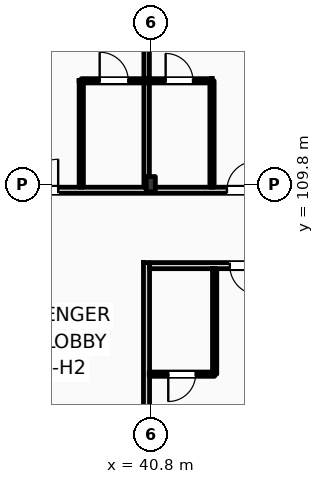
"""IFC4 building model, lengths in metres.
Left out: names, types, materials, properties, quantities, classifications, styles, units other than length and angle.
Written with IfcOpenShell. Run it as: python <this file> out.ifc"""

import sys

from ifc_helpers import new_model, si_unit, direction, frame, frame_2d, origin, origin_2d, place, context, subcontext, project, spatial, rectangle, i_section, extrude, element, fill, save


model = new_model("IFC4")
c1 = context("Model", 3, precision=1e-05, world=origin(), true_north=direction((0.0, 1.0)))
c2 = subcontext(c1, "Body", "Model", "MODEL_VIEW")
j1 = project(units=[si_unit("LENGTHUNIT", "METRE"), si_unit("PLANEANGLEUNIT", "RADIAN")], contexts=[c1])
p1 = place(None, origin())
s1 = spatial("IfcSite", under=j1, at=p1, CompositionType="ELEMENT")
p2 = place(p1, origin())
s2 = spatial("IfcBuilding", under=s1, at=p2, CompositionType="ELEMENT")
p3 = place(p2, frame((0.0, 0.0, 28.2)))
s3 = spatial("IfcBuildingStorey", under=s2, at=p3, CompositionType="ELEMENT", Elevation=28.2)
p4 = place(p3, frame((40.8, 109.8, 0.0), z_axis=(0.0, 0.0, 1.0), x_axis=(1.0, 0.0, 0.0)))
e1 = element("IfcColumn", 1, at=p4, inside=s3, PredefinedType="COLUMN", context=c2, shape_type="SweptSolid", body=[
    extrude(i_section(OverallWidth=0.3, OverallDepth=0.5, WebThickness=0.014, FlangeThickness=0.028, FilletRadius=0.027, at=origin_2d()), origin(), (0.0, 0.0, 1.0), 3.6),
])
p5 = place(p3, frame((10.65, 109.6, 0.0), z_axis=(0.0, 0.0, 1.0), x_axis=(1.0, 0.0, 0.0)))
e2 = element("IfcWall", 2, at=p5, inside=s3, PredefinedType="PARTITIONING", context=c2, shape_type="SweptSolid", body=[
    extrude(rectangle(XDim=109.21, YDim=0.2, at=frame_2d((54.605, 0.0))), origin(), (0.0, 0.0, 1.0), 2.8),
])
p6 = place(p5, frame((12.611, 0.0, 0.0)))
e3 = element("IfcOpeningElement", 3, at=p6, cuts=e2, PredefinedType="OPENING", context=c2, shape_type="SweptSolid", body=[
    extrude(rectangle(XDim=1.02, YDim=2.2, at=frame_2d((0.51, 1.1))), frame((0.0, 0.11, 0.0), z_axis=(0.0, -1.0, 0.0), x_axis=(1.0, 0.0, 0.0)), (0.0, 0.0, 1.0), 0.22),
])
p7 = place(p5, frame((19.451, 0.0, 0.0)))
e4 = element("IfcOpeningElement", 4, at=p7, cuts=e2, PredefinedType="OPENING", context=c2, shape_type="SweptSolid", body=[
    extrude(rectangle(XDim=1.02, YDim=2.2, at=frame_2d((0.51, 1.1))), frame((0.0, 0.11, 0.0), z_axis=(0.0, -1.0, 0.0), x_axis=(1.0, 0.0, 0.0)), (0.0, 0.0, 1.0), 0.22),
])
p8 = place(p5, frame((23.842, 0.0, 0.0)))
e5 = element("IfcOpeningElement", 5, at=p8, cuts=e2, PredefinedType="OPENING", context=c2, shape_type="SweptSolid", body=[
    extrude(rectangle(XDim=1.02, YDim=2.2, at=frame_2d((0.51, 1.1))), frame((0.0, 0.11, 0.0), z_axis=(0.0, -1.0, 0.0), x_axis=(1.0, 0.0, 0.0)), (0.0, 0.0, 1.0), 0.22),
])
p9 = place(p5, frame((26.084, 0.0, 0.0)))
e6 = element("IfcOpeningElement", 6, at=p9, cuts=e2, PredefinedType="OPENING", context=c2, shape_type="SweptSolid", body=[
    extrude(rectangle(XDim=1.02, YDim=2.2, at=frame_2d((0.51, 1.1))), frame((0.0, 0.11, 0.0), z_axis=(0.0, -1.0, 0.0), x_axis=(1.0, 0.0, 0.0)), (0.0, 0.0, 1.0), 0.22),
])
p10 = place(p5, frame((32.655, 0.0, 0.0)))
e7 = element("IfcOpeningElement", 7, at=p10, cuts=e2, PredefinedType="OPENING", context=c2, shape_type="SweptSolid", body=[
    extrude(rectangle(XDim=0.96, YDim=2.2, at=frame_2d((0.48, 1.1))), frame((0.0, 0.11, 0.0), z_axis=(0.0, -1.0, 0.0), x_axis=(1.0, 0.0, 0.0)), (0.0, 0.0, 1.0), 0.22),
])
p11 = place(p5, frame((34.895, 0.0, 0.0)))
e8 = element("IfcOpeningElement", 8, at=p11, cuts=e2, PredefinedType="OPENING", context=c2, shape_type="SweptSolid", body=[
    extrude(rectangle(XDim=0.96, YDim=2.2, at=frame_2d((0.48, 1.1))), frame((0.0, 0.11, 0.0), z_axis=(0.0, -1.0, 0.0), x_axis=(1.0, 0.0, 0.0)), (0.0, 0.0, 1.0), 0.22),
])
p12 = place(p5, frame((41.436, 0.0, 0.0)))
e9 = element("IfcOpeningElement", 9, at=p12, cuts=e2, PredefinedType="OPENING", context=c2, shape_type="SweptSolid", body=[
    extrude(rectangle(XDim=0.96, YDim=2.2, at=frame_2d((0.48, 1.1))), frame((0.0, 0.11, 0.0), z_axis=(0.0, -1.0, 0.0), x_axis=(1.0, 0.0, 0.0)), (0.0, 0.0, 1.0), 0.22),
])
p13 = place(p5, frame((43.427, 0.0, 0.0)))
e10 = element("IfcOpeningElement", 10, at=p13, cuts=e2, PredefinedType="OPENING", context=c2, shape_type="SweptSolid", body=[
    extrude(rectangle(XDim=0.96, YDim=2.2, at=frame_2d((0.48, 1.1))), frame((0.0, 0.11, 0.0), z_axis=(0.0, -1.0, 0.0), x_axis=(1.0, 0.0, 0.0)), (0.0, 0.0, 1.0), 0.22),
])
p14 = place(p5, frame((50.218, 0.0, 0.0)))
e11 = element("IfcOpeningElement", 11, at=p14, cuts=e2, PredefinedType="OPENING", context=c2, shape_type="SweptSolid", body=[
    extrude(rectangle(XDim=0.96, YDim=2.2, at=frame_2d((0.48, 1.1))), frame((0.0, 0.11, 0.0), z_axis=(0.0, -1.0, 0.0), x_axis=(1.0, 0.0, 0.0)), (0.0, 0.0, 1.0), 0.22),
])
p15 = place(p5, frame((54.859, 0.0, 0.0)))
e12 = element("IfcOpeningElement", 12, at=p15, cuts=e2, PredefinedType="OPENING", context=c2, shape_type="SweptSolid", body=[
    extrude(rectangle(XDim=0.96, YDim=2.2, at=frame_2d((0.48, 1.1))), frame((0.0, 0.11, 0.0), z_axis=(0.0, -1.0, 0.0), x_axis=(1.0, 0.0, 0.0)), (0.0, 0.0, 1.0), 0.22),
])
p16 = place(p5, frame((59.0, 0.0, 0.0)))
e13 = element("IfcOpeningElement", 13, at=p16, cuts=e2, PredefinedType="OPENING", context=c2, shape_type="SweptSolid", body=[
    extrude(rectangle(XDim=0.96, YDim=2.2, at=frame_2d((0.48, 1.1))), frame((0.0, 0.11, 0.0), z_axis=(0.0, -1.0, 0.0), x_axis=(1.0, 0.0, 0.0)), (0.0, 0.0, 1.0), 0.22),
])
p17 = place(p5, frame((63.39, 0.0, 0.0)))
e14 = element("IfcOpeningElement", 14, at=p17, cuts=e2, PredefinedType="OPENING", context=c2, shape_type="SweptSolid", body=[
    extrude(rectangle(XDim=0.96, YDim=2.2, at=frame_2d((0.48, 1.1))), frame((0.0, 0.11, 0.0), z_axis=(0.0, -1.0, 0.0), x_axis=(1.0, 0.0, 0.0)), (0.0, 0.0, 1.0), 0.22),
])
p18 = place(p5, frame((65.631, 0.0, 0.0)))
e15 = element("IfcOpeningElement", 15, at=p18, cuts=e2, PredefinedType="OPENING", context=c2, shape_type="SweptSolid", body=[
    extrude(rectangle(XDim=0.96, YDim=2.2, at=frame_2d((0.48, 1.1))), frame((0.0, 0.11, 0.0), z_axis=(0.0, -1.0, 0.0), x_axis=(1.0, 0.0, 0.0)), (0.0, 0.0, 1.0), 0.22),
])
p19 = place(p5, frame((72.172, 0.0, 0.0)))
e16 = element("IfcOpeningElement", 16, at=p19, cuts=e2, PredefinedType="OPENING", context=c2, shape_type="SweptSolid", body=[
    extrude(rectangle(XDim=0.96, YDim=2.2, at=frame_2d((0.48, 1.1))), frame((0.0, 0.11, 0.0), z_axis=(0.0, -1.0, 0.0), x_axis=(1.0, 0.0, 0.0)), (0.0, 0.0, 1.0), 0.22),
])
p20 = place(p5, frame((74.413, 0.0, 0.0)))
e17 = element("IfcOpeningElement", 17, at=p20, cuts=e2, PredefinedType="OPENING", context=c2, shape_type="SweptSolid", body=[
    extrude(rectangle(XDim=0.96, YDim=2.2, at=frame_2d((0.48, 1.1))), frame((0.0, 0.11, 0.0), z_axis=(0.0, -1.0, 0.0), x_axis=(1.0, 0.0, 0.0)), (0.0, 0.0, 1.0), 0.22),
])
p21 = place(p5, frame((80.954, 0.0, 0.0)))
e18 = element("IfcOpeningElement", 18, at=p21, cuts=e2, PredefinedType="OPENING", context=c2, shape_type="SweptSolid", body=[
    extrude(rectangle(XDim=0.96, YDim=2.2, at=frame_2d((0.48, 1.1))), frame((0.0, 0.11, 0.0), z_axis=(0.0, -1.0, 0.0), x_axis=(1.0, 0.0, 0.0)), (0.0, 0.0, 1.0), 0.22),
])
p22 = place(p5, frame((83.195, 0.0, 0.0)))
e19 = element("IfcOpeningElement", 19, at=p22, cuts=e2, PredefinedType="OPENING", context=c2, shape_type="SweptSolid", body=[
    extrude(rectangle(XDim=0.96, YDim=2.2, at=frame_2d((0.48, 1.1))), frame((0.0, 0.11, 0.0), z_axis=(0.0, -1.0, 0.0), x_axis=(1.0, 0.0, 0.0)), (0.0, 0.0, 1.0), 0.22),
])
p23 = place(p5, frame((89.735, 0.0, 0.0)))
e20 = element("IfcOpeningElement", 20, at=p23, cuts=e2, PredefinedType="OPENING", context=c2, shape_type="SweptSolid", body=[
    extrude(rectangle(XDim=0.96, YDim=2.2, at=frame_2d((0.48, 1.1))), frame((0.0, 0.11, 0.0), z_axis=(0.0, -1.0, 0.0), x_axis=(1.0, 0.0, 0.0)), (0.0, 0.0, 1.0), 0.22),
])
p24 = place(p5, frame((94.126, 0.0, 0.0)))
e21 = element("IfcOpeningElement", 21, at=p24, cuts=e2, PredefinedType="OPENING", context=c2, shape_type="SweptSolid", body=[
    extrude(rectangle(XDim=0.96, YDim=2.2, at=frame_2d((0.48, 1.1))), frame((0.0, 0.11, 0.0), z_axis=(0.0, -1.0, 0.0), x_axis=(1.0, 0.0, 0.0)), (0.0, 0.0, 1.0), 0.22),
])
p25 = place(p5, frame((98.517, 0.0, 0.0)))
e22 = element("IfcOpeningElement", 22, at=p25, cuts=e2, PredefinedType="OPENING", context=c2, shape_type="SweptSolid", body=[
    extrude(rectangle(XDim=0.96, YDim=2.2, at=frame_2d((0.48, 1.1))), frame((0.0, 0.11, 0.0), z_axis=(0.0, -1.0, 0.0), x_axis=(1.0, 0.0, 0.0)), (0.0, 0.0, 1.0), 0.22),
])
p26 = place(p5, frame((102.908, 0.0, 0.0)))
e23 = element("IfcOpeningElement", 23, at=p26, cuts=e2, PredefinedType="OPENING", context=c2, shape_type="SweptSolid", body=[
    extrude(rectangle(XDim=0.96, YDim=2.2, at=frame_2d((0.48, 1.1))), frame((0.0, 0.11, 0.0), z_axis=(0.0, -1.0, 0.0), x_axis=(1.0, 0.0, 0.0)), (0.0, 0.0, 1.0), 0.22),
])
p27 = place(p5, frame((105.099, 0.0, 0.0)))
e24 = element("IfcOpeningElement", 24, at=p27, cuts=e2, PredefinedType="OPENING", context=c2, shape_type="SweptSolid", body=[
    extrude(rectangle(XDim=0.96, YDim=2.2, at=frame_2d((0.48, 1.1))), frame((0.0, 0.11, 0.0), z_axis=(0.0, -1.0, 0.0), x_axis=(1.0, 0.0, 0.0)), (0.0, 0.0, 1.0), 0.22),
])
p28 = place(p5, frame((2.716, 0.0, 0.0)))
e25 = element("IfcOpeningElement", 25, at=p28, cuts=e2, PredefinedType="OPENING", context=c2, shape_type="SweptSolid", body=[
    extrude(rectangle(XDim=1.35, YDim=2.25, at=frame_2d((0.675, 1.125))), frame((0.0, 0.11, 0.0), z_axis=(0.0, -1.0, 0.0), x_axis=(1.0, 0.0, 0.0)), (0.0, 0.0, 1.0), 0.22),
])
p29 = place(p5, frame((6.65, 0.0, 0.0)))
e26 = element("IfcOpeningElement", 26, at=p29, cuts=e2, PredefinedType="OPENING", context=c2, shape_type="SweptSolid", body=[
    extrude(rectangle(XDim=1.35, YDim=2.25, at=frame_2d((0.675, 1.125))), frame((0.0, 0.11, 0.0), z_axis=(0.0, -1.0, 0.0), x_axis=(1.0, 0.0, 0.0)), (0.0, 0.0, 1.0), 0.22),
])
p30 = place(p5, frame((10.583, 0.0, 0.0)))
e27 = element("IfcOpeningElement", 27, at=p30, cuts=e2, PredefinedType="OPENING", context=c2, shape_type="SweptSolid", body=[
    extrude(rectangle(XDim=1.35, YDim=2.25, at=frame_2d((0.675, 1.125))), frame((0.0, 0.11, 0.0), z_axis=(0.0, -1.0, 0.0), x_axis=(1.0, 0.0, 0.0)), (0.0, 0.0, 1.0), 0.22),
])
p31 = place(p3, frame((40.76, 107.12, 0.0), z_axis=(0.0, 0.0, 1.0), x_axis=(1.0, 0.0, 0.0)))
e28 = element("IfcWall", 28, at=p31, inside=s3, PredefinedType="PARTITIONING", context=c2, shape_type="SweptSolid", body=[
    extrude(rectangle(XDim=23.44, YDim=0.2, at=frame_2d((11.72, 0.0))), origin(), (0.0, 0.0, 1.0), 3.36),
])
p32 = place(p31, frame((2.639, 0.0, 0.0)))
e29 = element("IfcOpeningElement", 29, at=p32, cuts=e28, PredefinedType="OPENING", context=c2, shape_type="SweptSolid", body=[
    extrude(rectangle(XDim=0.96, YDim=2.2, at=frame_2d((0.48, 1.1))), frame((0.0, 0.11, 0.0), z_axis=(0.0, -1.0, 0.0), x_axis=(1.0, 0.0, 0.0)), (0.0, 0.0, 1.0), 0.22),
])
p33 = place(p31, frame((4.348, 0.0, 0.0)))
e30 = element("IfcOpeningElement", 30, at=p33, cuts=e28, PredefinedType="OPENING", context=c2, shape_type="SweptSolid", body=[
    extrude(rectangle(XDim=0.96, YDim=2.2, at=frame_2d((0.48, 1.1))), frame((0.0, 0.11, 0.0), z_axis=(0.0, -1.0, 0.0), x_axis=(1.0, 0.0, 0.0)), (0.0, 0.0, 1.0), 0.22),
])
p34 = place(p31, frame((10.406, 0.0, 0.0)))
e31 = element("IfcOpeningElement", 31, at=p34, cuts=e28, PredefinedType="OPENING", context=c2, shape_type="SweptSolid", body=[
    extrude(rectangle(XDim=0.96, YDim=2.2, at=frame_2d((0.48, 1.1))), frame((0.0, 0.11, 0.0), z_axis=(0.0, -1.0, 0.0), x_axis=(1.0, 0.0, 0.0)), (0.0, 0.0, 1.0), 0.22),
])
p35 = place(p31, frame((12.164, 0.0, 0.0)))
e32 = element("IfcOpeningElement", 32, at=p35, cuts=e28, PredefinedType="OPENING", context=c2, shape_type="SweptSolid", body=[
    extrude(rectangle(XDim=0.96, YDim=2.2, at=frame_2d((0.48, 1.1))), frame((0.0, 0.11, 0.0), z_axis=(0.0, -1.0, 0.0), x_axis=(1.0, 0.0, 0.0)), (0.0, 0.0, 1.0), 0.22),
])
p36 = place(p31, frame((18.223, 0.0, 0.0)))
e33 = element("IfcOpeningElement", 33, at=p36, cuts=e28, PredefinedType="OPENING", context=c2, shape_type="SweptSolid", body=[
    extrude(rectangle(XDim=0.96, YDim=2.2, at=frame_2d((0.48, 1.1))), frame((0.0, 0.11, 0.0), z_axis=(0.0, -1.0, 0.0), x_axis=(1.0, 0.0, 0.0)), (0.0, 0.0, 1.0), 0.22),
])
p37 = place(p31, frame((20.031, 0.0, 0.0)))
e34 = element("IfcOpeningElement", 34, at=p37, cuts=e28, PredefinedType="OPENING", context=c2, shape_type="SweptSolid", body=[
    extrude(rectangle(XDim=0.96, YDim=2.2, at=frame_2d((0.48, 1.1))), frame((0.0, 0.11, 0.0), z_axis=(0.0, -1.0, 0.0), x_axis=(1.0, 0.0, 0.0)), (0.0, 0.0, 1.0), 0.22),
])
p38 = place(p3, frame((40.66, 98.77, 0.0), z_axis=(0.0, 0.0, 1.0), x_axis=(0.0, 1.0, 0.0)))
e35 = element("IfcWall", 35, at=p38, inside=s3, PredefinedType="PARTITIONING", context=c2, shape_type="SweptSolid", body=[
    extrude(rectangle(XDim=8.45, YDim=0.2, at=frame_2d((4.225, 0.0))), origin(), (0.0, 0.0, 1.0), 2.99),
])
p39 = place(p3, frame((40.664, 109.7, 0.0), z_axis=(0.0, 0.0, 1.0), x_axis=(0.0, 1.0, 0.0)))
e36 = element("IfcWall", 36, at=p39, inside=s3, PredefinedType="PARTITIONING", context=c2, shape_type="SweptSolid", body=[
    extrude(rectangle(XDim=8.15, YDim=0.18, at=frame_2d((4.075, 0.0))), origin(), (0.0, 0.0, 1.0), 2.99),
])
p40 = place(p3, frame((38.514, 109.7, 0.0), z_axis=(0.0, 0.0, 1.0), x_axis=(0.0, 1.0, 0.0)))
e37 = element("IfcWall", 37, at=p40, inside=s3, PredefinedType="PARTITIONING", context=c2, shape_type="SweptSolid", body=[
    extrude(rectangle(XDim=3.5, YDim=0.14, at=frame_2d((1.75, 0.0))), origin(), (0.0, 0.0, 1.0), 3.36),
])
p41 = place(p3, frame((38.514, 113.2, 0.0), z_axis=(0.0, 0.0, 1.0), x_axis=(1.0, 0.0, 0.0)))
e38 = element("IfcWall", 38, at=p41, inside=s3, PredefinedType="PARTITIONING", context=c2, shape_type="SweptSolid", body=[
    extrude(rectangle(XDim=2.15, YDim=0.14, at=frame_2d((1.075, 0.0))), origin(), (0.0, 0.0, 1.0), 3.36),
])
p42 = place(p41, frame((0.605, 0.0, 0.0)))
e39 = element("IfcOpeningElement", 39, at=p42, cuts=e38, PredefinedType="OPENING", context=c2, shape_type="SweptSolid", body=[
    extrude(rectangle(XDim=0.94, YDim=2.15, at=frame_2d((0.47, 1.075))), frame((0.0, 0.08, 0.0), z_axis=(0.0, -1.0, 0.0), x_axis=(1.0, 0.0, 0.0)), (0.0, 0.0, 1.0), 0.16),
])
p43 = place(p3, frame((42.814, 109.7, 0.0), z_axis=(0.0, 0.0, 1.0), x_axis=(0.0, 1.0, 0.0)))
e40 = element("IfcWall", 40, at=p43, inside=s3, PredefinedType="PARTITIONING", context=c2, shape_type="SweptSolid", body=[
    extrude(rectangle(XDim=3.5, YDim=0.14, at=frame_2d((1.75, 0.0))), origin(), (0.0, 0.0, 1.0), 3.36),
])
p44 = place(p3, frame((40.664, 113.2, 0.0), z_axis=(0.0, 0.0, 1.0), x_axis=(1.0, 0.0, 0.0)))
e41 = element("IfcWall", 41, at=p44, inside=s3, PredefinedType="PARTITIONING", context=c2, shape_type="SweptSolid", body=[
    extrude(rectangle(XDim=2.15, YDim=0.14, at=frame_2d((1.075, 0.0))), origin(), (0.0, 0.0, 1.0), 3.36),
])
p45 = place(p44, frame((0.625, 0.0, 0.0)))
e42 = element("IfcOpeningElement", 42, at=p45, cuts=e41, PredefinedType="OPENING", context=c2, shape_type="SweptSolid", body=[
    extrude(rectangle(XDim=0.9, YDim=2.1, at=frame_2d((0.45, 1.05))), frame((0.0, 0.08, 0.0), z_axis=(0.0, -1.0, 0.0), x_axis=(1.0, 0.0, 0.0)), (0.0, 0.0, 1.0), 0.16),
])
p46 = place(p3, frame((42.9, 103.55, 0.0), z_axis=(0.0, 0.0, 1.0), x_axis=(0.0, 1.0, 0.0)))
e43 = element("IfcWall", 43, at=p46, inside=s3, PredefinedType="PARTITIONING", context=c2, shape_type="SweptSolid", body=[
    extrude(rectangle(XDim=3.47, YDim=0.14, at=frame_2d((1.735, 0.0))), origin(), (0.0, 0.0, 1.0), 3.36),
])
p47 = place(p3, frame((40.75, 103.55, 0.0), z_axis=(0.0, 0.0, 1.0), x_axis=(1.0, 0.0, 0.0)))
e44 = element("IfcWall", 44, at=p47, inside=s3, PredefinedType="PARTITIONING", context=c2, shape_type="SweptSolid", body=[
    extrude(rectangle(XDim=2.15, YDim=0.14, at=frame_2d((1.075, 0.0))), origin(), (0.0, 0.0, 1.0), 3.36),
])
p48 = place(p47, frame((0.625, 0.0, 0.0)))
e45 = element("IfcOpeningElement", 45, at=p48, cuts=e44, PredefinedType="OPENING", context=c2, shape_type="SweptSolid", body=[
    extrude(rectangle(XDim=0.9, YDim=2.1, at=frame_2d((0.45, 1.05))), frame((0.0, 0.08, 0.0), z_axis=(0.0, -1.0, 0.0), x_axis=(1.0, 0.0, 0.0)), (0.0, 0.0, 1.0), 0.16),
])
p49 = place(p9, origin())
e46 = element("IfcDoor", 46, at=p49, inside=s3, OperationType="SINGLE_SWING_RIGHT", PredefinedType="DOOR", context=c2, shape_type="SweptSolid", body=[
    extrude(rectangle(XDim=1.02, YDim=2.2, at=frame_2d((0.51, 1.1))), frame((0.0, 0.025, 0.0), z_axis=(0.0, -1.0, 0.0), x_axis=(1.0, 0.0, 0.0)), (0.0, 0.0, 1.0), 0.05),
])
fill(e6, e46)
p50 = place(p42, origin())
e47 = element("IfcDoor", 47, at=p50, inside=s3, OperationType="SINGLE_SWING_LEFT", PredefinedType="DOOR", context=c2, shape_type="SweptSolid", body=[
    extrude(rectangle(XDim=0.94, YDim=2.15, at=frame_2d((0.47, 1.075))), frame((0.0, 0.025, 0.0), z_axis=(0.0, -1.0, 0.0), x_axis=(1.0, 0.0, 0.0)), (0.0, 0.0, 1.0), 0.05),
])
fill(e39, e47)
p51 = place(p10, origin())
e48 = element("IfcDoor", 48, at=p51, inside=s3, OperationType="SINGLE_SWING_RIGHT", PredefinedType="DOOR", context=c2, shape_type="SweptSolid", body=[
    extrude(rectangle(XDim=0.96, YDim=2.2, at=frame_2d((0.48, 1.1))), frame((0.0, 0.025, 0.0), z_axis=(0.0, -1.0, 0.0), x_axis=(1.0, 0.0, 0.0)), (0.0, 0.0, 1.0), 0.05),
])
fill(e7, e48)
p52 = place(p45, origin())
e49 = element("IfcDoor", 49, at=p52, inside=s3, OperationType="SINGLE_SWING_LEFT", PredefinedType="DOOR", context=c2, shape_type="SweptSolid", body=[
    extrude(rectangle(XDim=0.9, YDim=2.1, at=frame_2d((0.45, 1.05))), frame((0.0, 0.025, 0.0), z_axis=(0.0, -1.0, 0.0), x_axis=(1.0, 0.0, 0.0)), (0.0, 0.0, 1.0), 0.05),
])
fill(e42, e49)
p53 = place(p32, frame((0.96, 0.0, 0.0), z_axis=(0.0, 0.0, 1.0), x_axis=(-1.0, 0.0, 0.0)))
e50 = element("IfcDoor", 50, at=p53, inside=s3, OperationType="SINGLE_SWING_RIGHT", PredefinedType="DOOR", context=c2, shape_type="SweptSolid", body=[
    extrude(rectangle(XDim=0.96, YDim=2.2, at=frame_2d((0.48, 1.1))), frame((0.0, 0.025, 0.0), z_axis=(0.0, -1.0, 0.0), x_axis=(1.0, 0.0, 0.0)), (0.0, 0.0, 1.0), 0.05),
])
fill(e29, e50)
p54 = place(p48, frame((0.9, 0.0, 0.0), z_axis=(0.0, 0.0, 1.0), x_axis=(-1.0, 0.0, 0.0)))
e51 = element("IfcDoor", 51, at=p54, inside=s3, OperationType="SINGLE_SWING_LEFT", PredefinedType="DOOR", context=c2, shape_type="SweptSolid", body=[
    extrude(rectangle(XDim=0.9, YDim=2.1, at=frame_2d((0.45, 1.05))), frame((0.0, 0.025, 0.0), z_axis=(0.0, -1.0, 0.0), x_axis=(1.0, 0.0, 0.0)), (0.0, 0.0, 1.0), 0.05),
])
fill(e45, e51)
save(model, sys.argv[1])
